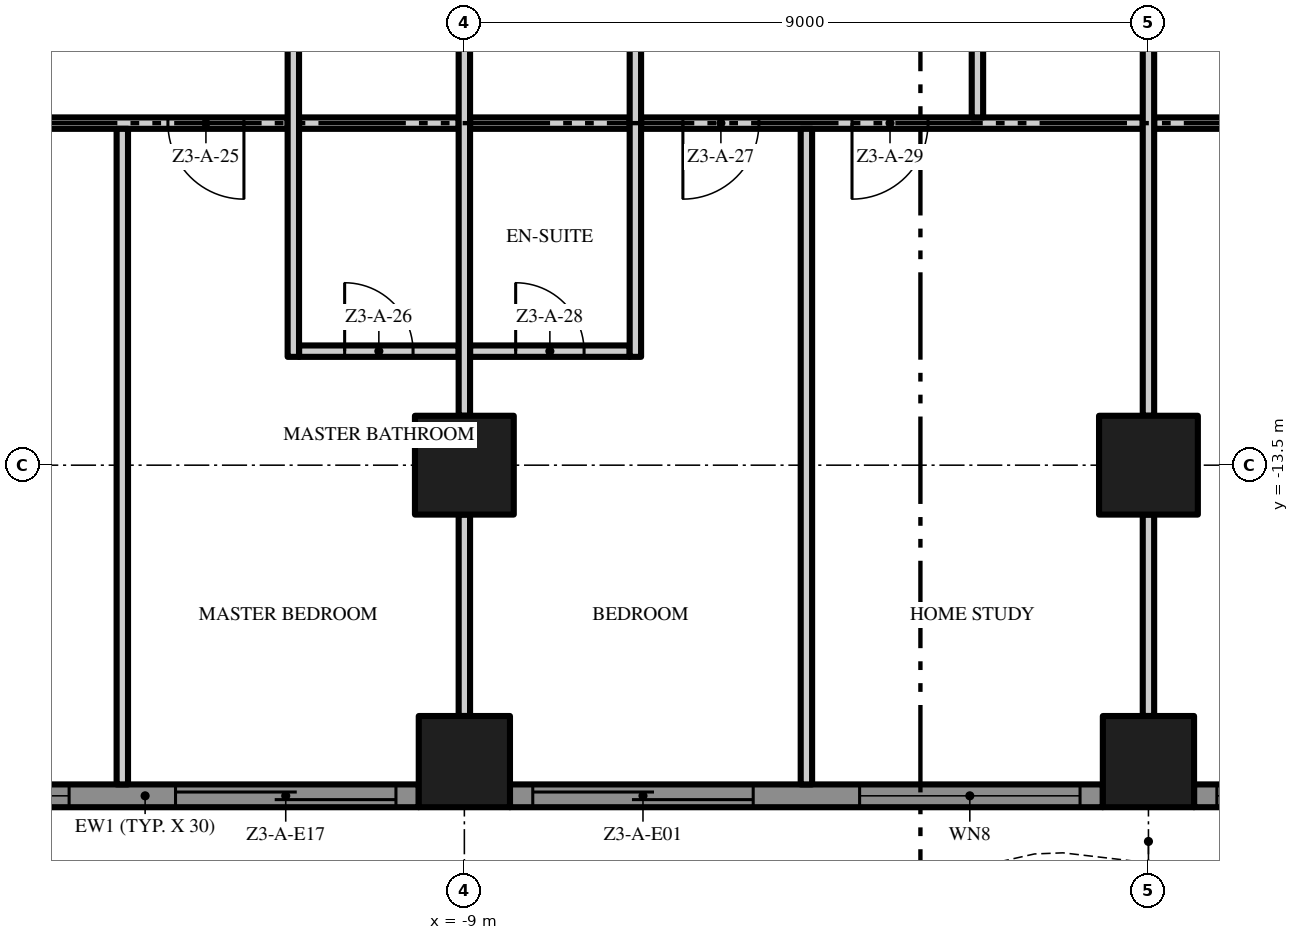
"""IFC4 building model, lengths in metres.
Left out: names, types, materials, properties, quantities, classifications, styles, units other than length and angle.
Written with IfcOpenShell. Run it as: python <this file> out.ifc"""

import sys

from ifc_helpers import new_model, si_unit, direction, frame, frame_2d, origin, origin_2d, place, context, subcontext, project, spatial, polyline, rectangle, outline, extrude, element, fill, save


model = new_model("IFC4")
c1 = context("Model", 3, precision=1e-05, world=origin(), true_north=direction((0.0, 1.0)))
c2 = subcontext(c1, "Body", "Model", "MODEL_VIEW")
j1 = project(units=[si_unit("LENGTHUNIT", "METRE"), si_unit("PLANEANGLEUNIT", "RADIAN")], contexts=[c1])
p1 = place(None, origin())
s1 = spatial("IfcSite", under=j1, at=p1, CompositionType="ELEMENT")
p2 = place(p1, origin())
s2 = spatial("IfcBuilding", under=s1, at=p2, CompositionType="ELEMENT")
p3 = place(p2, frame((0.0, 0.0, 132.6)))
s3 = spatial("IfcBuildingStorey", under=s2, at=p3, CompositionType="ELEMENT", Elevation=132.6)
p4 = place(p3, frame((-9.0, -13.5, 0.0), z_axis=(0.0, 0.0, 1.0), x_axis=(1.0, 0.0, 0.0)))
e1 = element("IfcColumn", 1, at=p4, inside=s3, PredefinedType="COLUMN", context=c2, shape_type="SweptSolid", body=[
    extrude(rectangle(XDim=1.3, YDim=1.3, at=origin_2d()), origin(), (0.0, 0.0, 1.0), 3.5),
])
p5 = place(p3, frame((-9.0, -17.4, 0.0), z_axis=(0.0, 0.0, 1.0), x_axis=(1.0, 0.0, 0.0)))
e2 = element("IfcColumn", 2, at=p5, inside=s3, PredefinedType="COLUMN", context=c2, shape_type="SweptSolid", body=[
    extrude(rectangle(XDim=1.2, YDim=1.2, at=origin_2d()), origin(), (0.0, 0.0, 1.0), 3.5),
])
p6 = place(p3, frame((0.0, -13.5, 0.0), z_axis=(0.0, 0.0, 1.0), x_axis=(1.0, 0.0, 0.0)))
e3 = element("IfcColumn", 3, at=p6, inside=s3, PredefinedType="COLUMN", context=c2, shape_type="SweptSolid", body=[
    extrude(rectangle(XDim=1.3, YDim=1.3, at=origin_2d()), origin(), (0.0, 0.0, 1.0), 3.5),
])
p7 = place(p3, frame((0.0, -17.4, 0.0), z_axis=(0.0, 0.0, 1.0), x_axis=(1.0, 0.0, 0.0)))
e4 = element("IfcColumn", 4, at=p7, inside=s3, PredefinedType="COLUMN", context=c2, shape_type="SweptSolid", body=[
    extrude(rectangle(XDim=1.2, YDim=1.2, at=origin_2d()), origin(), (0.0, 0.0, 1.0), 3.5),
])
p8 = place(p3, frame((-9.6, -17.85, 0.0), z_axis=(0.0, 0.0, 1.0), x_axis=(-1.0, 0.0, 0.0)))
e5 = element("IfcWall", 5, at=p8, inside=s3, PredefinedType="SOLIDWALL", context=c2, shape_type="SweptSolid", body=[
    extrude(rectangle(XDim=7.2, YDim=0.3, at=frame_2d((3.6, 0.0))), origin(), (0.0, 0.0, 1.0), 3.5),
])
p9 = place(p8, frame((4.6, 0.0, 0.45)))
e6 = element("IfcOpeningElement", 6, at=p9, cuts=e5, PredefinedType="OPENING", context=c2, shape_type="SweptSolid", body=[
    extrude(rectangle(XDim=2.3, YDim=2.65, at=frame_2d((1.15, 1.325))), frame((0.0, 0.16, 0.0), z_axis=(0.0, -1.0, 0.0), x_axis=(1.0, 0.0, 0.0)), (0.0, 0.0, 1.0), 0.32),
])
p10 = place(p8, frame((0.3, 0.0, 0.0)))
e7 = element("IfcOpeningElement", 7, at=p10, cuts=e5, PredefinedType="OPENING", context=c2, shape_type="SweptSolid", body=[
    extrude(rectangle(XDim=2.9, YDim=2.4, at=frame_2d((1.45, 1.2))), frame((0.0, 0.16, 0.0), z_axis=(0.0, -1.0, 0.0), x_axis=(1.0, 0.0, 0.0)), (0.0, 0.0, 1.0), 0.32),
])
p11 = place(p3, frame((-0.6, -17.85, 0.0), z_axis=(0.0, 0.0, 1.0), x_axis=(-1.0, 0.0, 0.0)))
e8 = element("IfcWall", 8, at=p11, inside=s3, PredefinedType="SOLIDWALL", context=c2, shape_type="SweptSolid", body=[
    extrude(rectangle(XDim=7.8, YDim=0.3, at=frame_2d((3.9, 0.0))), origin(), (0.0, 0.0, 1.0), 3.5),
])
p12 = place(p11, frame((4.6, 0.0, 0.0)))
e9 = element("IfcOpeningElement", 9, at=p12, cuts=e8, PredefinedType="OPENING", context=c2, shape_type="SweptSolid", body=[
    extrude(rectangle(XDim=2.9, YDim=2.4, at=frame_2d((1.45, 1.2))), frame((0.0, 0.16, 0.0), z_axis=(0.0, -1.0, 0.0), x_axis=(1.0, 0.0, 0.0)), (0.0, 0.0, 1.0), 0.32),
])
p13 = place(p11, frame((0.3, 0.0, 0.45)))
e10 = element("IfcOpeningElement", 10, at=p13, cuts=e8, PredefinedType="OPENING", context=c2, shape_type="SweptSolid", body=[
    extrude(rectangle(XDim=2.9, YDim=2.65, at=frame_2d((1.45, 1.325))), frame((0.0, 0.16, 0.0), z_axis=(0.0, -1.0, 0.0), x_axis=(1.0, 0.0, 0.0)), (0.0, 0.0, 1.0), 0.32),
])
p14 = place(p3, frame((8.4, -17.85, 0.0), z_axis=(0.0, 0.0, 1.0), x_axis=(-1.0, 0.0, 0.0)))
e11 = element("IfcWall", 11, at=p14, inside=s3, PredefinedType="SOLIDWALL", context=c2, shape_type="SweptSolid", body=[
    extrude(rectangle(XDim=7.8, YDim=0.3, at=frame_2d((3.9, 0.0))), origin(), (0.0, 0.0, 1.0), 3.5),
])
p15 = place(p14, frame((4.6, 0.0, 0.45)))
e12 = element("IfcOpeningElement", 12, at=p15, cuts=e11, PredefinedType="OPENING", context=c2, shape_type="SweptSolid", body=[
    extrude(rectangle(XDim=2.9, YDim=2.65, at=frame_2d((1.45, 1.325))), frame((0.0, 0.16, 0.0), z_axis=(0.0, -1.0, 0.0), x_axis=(1.0, 0.0, 0.0)), (0.0, 0.0, 1.0), 0.32),
])
p16 = place(p14, frame((0.3, 0.0, 0.0)))
e13 = element("IfcOpeningElement", 13, at=p16, cuts=e11, PredefinedType="OPENING", context=c2, shape_type="SweptSolid", body=[
    extrude(rectangle(XDim=2.9, YDim=2.4, at=frame_2d((1.45, 1.2))), frame((0.0, 0.16, 0.0), z_axis=(0.0, -1.0, 0.0), x_axis=(1.0, 0.0, 0.0)), (0.0, 0.0, 1.0), 0.32),
])
p17 = place(p3, origin())
e14 = element("IfcWall", 14, at=p17, inside=s3, PredefinedType="USERDEFINED", context=c2, shape_type="SweptSolid", body=[
    extrude(outline(polyline([(-18.0, -18.951), (-16.5, -18.615), (-16.125, -18.6), (-15.0, -18.731), (-13.5, -19.255), (-12.0, -19.988), (-10.5, -20.649), (-9.0, -20.985), (-8.625, -21.0), (-7.5, -20.869), (-6.0, -20.345), (-4.5, -19.612), (-3.0, -18.951), (-1.5, -18.615), (-1.125, -18.6), (0.0, -18.731), (1.5, -19.255), (3.0, -19.988), (4.5, -20.649), (6.0, -20.985), (6.375, -21.0), (7.5, -20.869), (9.0, -20.345), (10.5, -19.612), (12.0, -18.951), (13.5, -18.615), (13.875, -18.6), (15.0, -18.731), (16.5, -19.255), (18.0, -19.988), (18.11, -19.763), (16.596, -19.024), (15.056, -18.486), (13.885, -18.349), (13.467, -18.366), (11.921, -18.713), (10.395, -19.385), (8.904, -20.114), (7.444, -20.624), (6.365, -20.749), (6.033, -20.736), (4.579, -20.41), (3.105, -19.761), (1.596, -19.024), (0.056, -18.486), (-1.115, -18.349), (-1.533, -18.366), (-3.079, -18.713), (-4.605, -19.385), (-6.096, -20.114), (-7.556, -20.624), (-8.635, -20.749), (-8.967, -20.736), (-10.421, -20.41), (-11.895, -19.761), (-13.404, -19.024), (-14.944, -18.486), (-16.115, -18.349), (-16.533, -18.366), (-18.055, -18.708), (-18.0, -18.951)])), origin(), (0.0, 0.0, 1.0), 0.9),
])
p18 = place(p3, frame((-11.175, -12.0, 0.0), z_axis=(0.0, 0.0, 1.0), x_axis=(1.0, 0.0, 0.0)))
e15 = element("IfcWall", 15, at=p18, inside=s3, PredefinedType="PARTITIONING", context=c2, shape_type="SweptSolid", body=[
    extrude(rectangle(XDim=2.1, YDim=0.15, at=frame_2d((1.05, 0.0))), origin(), (0.0, 0.0, 1.0), 3.5),
])
p19 = place(p18, frame((0.6, 0.0, 0.0)))
e16 = element("IfcOpeningElement", 16, at=p19, cuts=e15, PredefinedType="OPENING", context=c2, shape_type="SweptSolid", body=[
    extrude(rectangle(XDim=0.9, YDim=2.1, at=frame_2d((0.45, 1.05))), frame((0.0, 0.085, 0.0), z_axis=(0.0, -1.0, 0.0), x_axis=(1.0, 0.0, 0.0)), (0.0, 0.0, 1.0), 0.17),
])
p20 = place(p3, frame((-8.925, -12.0, 0.0), z_axis=(0.0, 0.0, 1.0), x_axis=(1.0, 0.0, 0.0)))
e17 = element("IfcWall", 17, at=p20, inside=s3, PredefinedType="PARTITIONING", context=c2, shape_type="SweptSolid", body=[
    extrude(rectangle(XDim=2.1, YDim=0.15, at=frame_2d((1.05, 0.0))), origin(), (0.0, 0.0, 1.0), 3.5),
])
p21 = place(p20, frame((0.6, 0.0, 0.0)))
e18 = element("IfcOpeningElement", 18, at=p21, cuts=e17, PredefinedType="OPENING", context=c2, shape_type="SweptSolid", body=[
    extrude(rectangle(XDim=0.9, YDim=2.1, at=frame_2d((0.45, 1.05))), frame((0.0, 0.085, 0.0), z_axis=(0.0, -1.0, 0.0), x_axis=(1.0, 0.0, 0.0)), (0.0, 0.0, 1.0), 0.17),
])
p22 = place(p3, frame((-11.325, -9.0, 0.0), z_axis=(0.0, 0.0, 1.0), x_axis=(-1.0, 0.0, 0.0)))
e19 = element("IfcWall", 19, at=p22, inside=s3, PredefinedType="PARTITIONING", context=c2, shape_type="SweptSolid", body=[
    extrude(rectangle(XDim=10.875, YDim=0.15, at=frame_2d((5.438, 0.0))), origin(), (0.0, 0.0, 1.0), 3.5),
])
p23 = place(p22, frame((3.175, 0.0, 0.0)))
e20 = element("IfcOpeningElement", 20, at=p23, cuts=e19, PredefinedType="OPENING", context=c2, shape_type="SweptSolid", body=[
    extrude(rectangle(XDim=1.8, YDim=2.4, at=frame_2d((0.9, 1.2))), frame((0.0, 0.085, 0.0), z_axis=(0.0, -1.0, 0.0), x_axis=(1.0, 0.0, 0.0)), (0.0, 0.0, 1.0), 0.17),
])
p24 = place(p22, frame((0.575, 0.0, 0.0)))
e21 = element("IfcOpeningElement", 21, at=p24, cuts=e19, PredefinedType="OPENING", context=c2, shape_type="SweptSolid", body=[
    extrude(rectangle(XDim=1.0, YDim=2.4, at=frame_2d((0.5, 1.2))), frame((0.0, 0.085, 0.0), z_axis=(0.0, -1.0, 0.0), x_axis=(1.0, 0.0, 0.0)), (0.0, 0.0, 1.0), 0.17),
])
for number, where, z_axis, x_axis in (
    (22, (-11.175, -9.0, 0.0), (0.0, 0.0, 1.0), (1.0, 0.0, 0.0)),
    (23, (-8.925, -9.0, 0.0), (0.0, 0.0, 1.0), (1.0, 0.0, 0.0)),
):
    element("IfcWall", number, at=place(p3, frame(where, z_axis=z_axis, x_axis=x_axis)), inside=s3, PredefinedType="PARTITIONING", context=c2, shape_type="SweptSolid", body=[
        extrude(rectangle(XDim=2.1, YDim=0.15, at=frame_2d((1.05, 0.0))), origin(), (0.0, 0.0, 1.0), 3.5),
    ])
p25 = place(p3, frame((-0.075, -9.0, 0.0), z_axis=(0.0, 0.0, 1.0), x_axis=(-1.0, 0.0, 0.0)))
e24 = element("IfcWall", 24, at=p25, inside=s3, PredefinedType="PARTITIONING", context=c2, shape_type="SweptSolid", body=[
    extrude(rectangle(XDim=6.6, YDim=0.15, at=frame_2d((3.3, 0.0))), origin(), (0.0, 0.0, 1.0), 3.5),
])
p26 = place(p25, frame((5.05, 0.0, 0.0)))
e25 = element("IfcOpeningElement", 25, at=p26, cuts=e24, PredefinedType="OPENING", context=c2, shape_type="SweptSolid", body=[
    extrude(rectangle(XDim=1.0, YDim=2.4, at=frame_2d((0.5, 1.2))), frame((0.0, 0.085, 0.0), z_axis=(0.0, -1.0, 0.0), x_axis=(1.0, 0.0, 0.0)), (0.0, 0.0, 1.0), 0.17),
])
p27 = place(p25, frame((2.825, 0.0, 0.0)))
e26 = element("IfcOpeningElement", 26, at=p27, cuts=e24, PredefinedType="OPENING", context=c2, shape_type="SweptSolid", body=[
    extrude(rectangle(XDim=1.0, YDim=2.4, at=frame_2d((0.5, 1.2))), frame((0.0, 0.085, 0.0), z_axis=(0.0, -1.0, 0.0), x_axis=(1.0, 0.0, 0.0)), (0.0, 0.0, 1.0), 0.17),
])
p28 = place(p3, frame((8.925, -9.0, 0.0), z_axis=(0.0, 0.0, 1.0), x_axis=(-1.0, 0.0, 0.0)))
e27 = element("IfcWall", 27, at=p28, inside=s3, PredefinedType="PARTITIONING", context=c2, shape_type="SweptSolid", body=[
    extrude(rectangle(XDim=8.85, YDim=0.15, at=frame_2d((4.425, 0.0))), origin(), (0.0, 0.0, 1.0), 3.5),
])
p29 = place(p28, frame((6.3, 0.0, 0.0)))
e28 = element("IfcOpeningElement", 28, at=p29, cuts=e27, PredefinedType="OPENING", context=c2, shape_type="SweptSolid", body=[
    extrude(rectangle(XDim=1.5, YDim=2.4, at=frame_2d((0.75, 1.2))), frame((0.0, 0.085, 0.0), z_axis=(0.0, -1.0, 0.0), x_axis=(1.0, 0.0, 0.0)), (0.0, 0.0, 1.0), 0.17),
])
p30 = place(p3, frame((-13.5, -17.7, 0.0), z_axis=(0.0, 0.0, 1.0), x_axis=(0.0, 1.0, 0.0)))
e29 = element("IfcWall", 29, at=p30, inside=s3, PredefinedType="PARTITIONING", context=c2, shape_type="SweptSolid", body=[
    extrude(rectangle(XDim=8.625, YDim=0.15, at=frame_2d((4.312, 0.0))), origin(), (0.0, 0.0, 1.0), 3.5),
])
p31 = place(p3, frame((-11.25, -4.575, 0.0), z_axis=(0.0, 0.0, 1.0), x_axis=(0.0, -1.0, 0.0)))
e30 = element("IfcWall", 30, at=p31, inside=s3, PredefinedType="PARTITIONING", context=c2, shape_type="SweptSolid", body=[
    extrude(rectangle(XDim=7.5, YDim=0.15, at=frame_2d((3.75, 0.0))), origin(), (0.0, 0.0, 1.0), 3.5),
])
p32 = place(p31, frame((1.725, 0.0, 0.0)))
e31 = element("IfcOpeningElement", 31, at=p32, cuts=e30, PredefinedType="OPENING", context=c2, shape_type="SweptSolid", body=[
    extrude(rectangle(XDim=0.9, YDim=2.1, at=frame_2d((0.45, 1.05))), frame((0.0, 0.085, 0.0), z_axis=(0.0, -1.0, 0.0), x_axis=(1.0, 0.0, 0.0)), (0.0, 0.0, 1.0), 0.17),
])
p33 = place(p3, frame((-9.0, -16.8, 0.0), z_axis=(0.0, 0.0, 1.0), x_axis=(0.0, 1.0, 0.0)))
e32 = element("IfcWall", 32, at=p33, inside=s3, PredefinedType="PARTITIONING", context=c2, shape_type="SweptSolid", body=[
    extrude(rectangle(XDim=2.65, YDim=0.15, at=frame_2d((1.325, 0.0))), origin(), (0.0, 0.0, 1.0), 3.5),
])
p34 = place(p3, frame((-9.0, -12.85, 0.0), z_axis=(0.0, 0.0, 1.0), x_axis=(0.0, 1.0, 0.0)))
e33 = element("IfcWall", 33, at=p34, inside=s3, PredefinedType="PARTITIONING", context=c2, shape_type="SweptSolid", body=[
    extrude(rectangle(XDim=7.7, YDim=0.15, at=frame_2d((3.85, 0.0))), origin(), (0.0, 0.0, 1.0), 3.5),
])
p35 = place(p3, frame((-6.75, -12.075, 0.0), z_axis=(0.0, 0.0, 1.0), x_axis=(0.0, 1.0, 0.0)))
e34 = element("IfcWall", 34, at=p35, inside=s3, PredefinedType="PARTITIONING", context=c2, shape_type="SweptSolid", body=[
    extrude(rectangle(XDim=7.65, YDim=0.15, at=frame_2d((3.825, 0.0))), origin(), (0.0, 0.0, 1.0), 3.5),
])
p36 = place(p3, frame((-4.5, -17.7, 0.0), z_axis=(0.0, 0.0, 1.0), x_axis=(0.0, 1.0, 0.0)))
e35 = element("IfcWall", 35, at=p36, inside=s3, PredefinedType="PARTITIONING", context=c2, shape_type="SweptSolid", body=[
    extrude(rectangle(XDim=8.625, YDim=0.15, at=frame_2d((4.312, 0.0))), origin(), (0.0, 0.0, 1.0), 3.5),
])
p37 = place(p3, frame((-2.25, -8.925, 0.0), z_axis=(0.0, 0.0, 1.0), x_axis=(0.0, 1.0, 0.0)))
e36 = element("IfcWall", 36, at=p37, inside=s3, PredefinedType="PARTITIONING", context=c2, shape_type="SweptSolid", body=[
    extrude(rectangle(XDim=4.5, YDim=0.15, at=frame_2d((2.25, 0.0))), origin(), (0.0, 0.0, 1.0), 3.5),
])
p38 = place(p3, frame((0.0, -16.8, 0.0), z_axis=(0.0, 0.0, 1.0), x_axis=(0.0, 1.0, 0.0)))
e37 = element("IfcWall", 37, at=p38, inside=s3, PredefinedType="PARTITIONING", context=c2, shape_type="SweptSolid", body=[
    extrude(rectangle(XDim=2.65, YDim=0.15, at=frame_2d((1.325, 0.0))), origin(), (0.0, 0.0, 1.0), 3.5),
])
p39 = place(p3, frame((0.0, -12.85, 0.0), z_axis=(0.0, 0.0, 1.0), x_axis=(0.0, 1.0, 0.0)))
e38 = element("IfcWall", 38, at=p39, inside=s3, PredefinedType="PARTITIONING", context=c2, shape_type="SweptSolid", body=[
    extrude(rectangle(XDim=7.7, YDim=0.15, at=frame_2d((3.85, 0.0))), origin(), (0.0, 0.0, 1.0), 3.5),
])
p40 = place(p9, origin())
e39 = element("IfcWindow", 39, at=p40, inside=s3, PartitioningType="SINGLE_PANEL", PredefinedType="WINDOW", context=c2, shape_type="SweptSolid", body=[
    extrude(rectangle(XDim=2.3, YDim=2.65, at=frame_2d((1.15, 1.325))), frame((0.0, 0.03, 0.0), z_axis=(0.0, -1.0, 0.0), x_axis=(1.0, 0.0, 0.0)), (0.0, 0.0, 1.0), 0.06),
])
fill(e6, e39)
p41 = place(p10, origin())
e40 = element("IfcDoor", 40, at=p41, inside=s3, OperationType="SINGLE_SWING_LEFT", PredefinedType="DOOR", context=c2, shape_type="SweptSolid", body=[
    extrude(rectangle(XDim=2.9, YDim=2.4, at=frame_2d((1.45, 1.2))), frame((0.0, 0.025, 0.0), z_axis=(0.0, -1.0, 0.0), x_axis=(1.0, 0.0, 0.0)), (0.0, 0.0, 1.0), 0.05),
])
fill(e7, e40)
p42 = place(p12, origin())
e41 = element("IfcDoor", 41, at=p42, inside=s3, OperationType="SINGLE_SWING_LEFT", PredefinedType="DOOR", context=c2, shape_type="SweptSolid", body=[
    extrude(rectangle(XDim=2.9, YDim=2.4, at=frame_2d((1.45, 1.2))), frame((0.0, 0.025, 0.0), z_axis=(0.0, -1.0, 0.0), x_axis=(1.0, 0.0, 0.0)), (0.0, 0.0, 1.0), 0.05),
])
fill(e9, e41)
p43 = place(p13, origin())
e42 = element("IfcWindow", 42, at=p43, inside=s3, PartitioningType="SINGLE_PANEL", PredefinedType="WINDOW", context=c2, shape_type="SweptSolid", body=[
    extrude(rectangle(XDim=2.9, YDim=2.65, at=frame_2d((1.45, 1.325))), frame((0.0, 0.03, 0.0), z_axis=(0.0, -1.0, 0.0), x_axis=(1.0, 0.0, 0.0)), (0.0, 0.0, 1.0), 0.06),
])
fill(e10, e42)
p44 = place(p15, origin())
e43 = element("IfcWindow", 43, at=p44, inside=s3, PartitioningType="SINGLE_PANEL", PredefinedType="WINDOW", context=c2, shape_type="SweptSolid", body=[
    extrude(rectangle(XDim=2.9, YDim=2.65, at=frame_2d((1.45, 1.325))), frame((0.0, 0.03, 0.0), z_axis=(0.0, -1.0, 0.0), x_axis=(1.0, 0.0, 0.0)), (0.0, 0.0, 1.0), 0.06),
])
fill(e12, e43)
p45 = place(p24, origin())
e44 = element("IfcDoor", 44, at=p45, inside=s3, OperationType="SINGLE_SWING_LEFT", PredefinedType="DOOR", context=c2, shape_type="SweptSolid", body=[
    extrude(rectangle(XDim=1.0, YDim=2.4, at=frame_2d((0.5, 1.2))), frame((0.0, 0.025, 0.0), z_axis=(0.0, -1.0, 0.0), x_axis=(1.0, 0.0, 0.0)), (0.0, 0.0, 1.0), 0.05),
])
fill(e21, e44)
p46 = place(p19, origin())
e45 = element("IfcDoor", 45, at=p46, inside=s3, OperationType="SINGLE_SWING_LEFT", PredefinedType="DOOR", context=c2, shape_type="SweptSolid", body=[
    extrude(rectangle(XDim=0.9, YDim=2.1, at=frame_2d((0.45, 1.05))), frame((0.0, 0.025, 0.0), z_axis=(0.0, -1.0, 0.0), x_axis=(1.0, 0.0, 0.0)), (0.0, 0.0, 1.0), 0.05),
])
fill(e16, e45)
p47 = place(p26, origin())
e46 = element("IfcDoor", 46, at=p47, inside=s3, OperationType="SINGLE_SWING_RIGHT", PredefinedType="DOOR", context=c2, shape_type="SweptSolid", body=[
    extrude(rectangle(XDim=1.0, YDim=2.4, at=frame_2d((0.5, 1.2))), frame((0.0, 0.025, 0.0), z_axis=(0.0, -1.0, 0.0), x_axis=(1.0, 0.0, 0.0)), (0.0, 0.0, 1.0), 0.05),
])
fill(e25, e46)
p48 = place(p21, origin())
e47 = element("IfcDoor", 47, at=p48, inside=s3, OperationType="SINGLE_SWING_LEFT", PredefinedType="DOOR", context=c2, shape_type="SweptSolid", body=[
    extrude(rectangle(XDim=0.9, YDim=2.1, at=frame_2d((0.45, 1.05))), frame((0.0, 0.025, 0.0), z_axis=(0.0, -1.0, 0.0), x_axis=(1.0, 0.0, 0.0)), (0.0, 0.0, 1.0), 0.05),
])
fill(e18, e47)
p49 = place(p27, origin())
e48 = element("IfcDoor", 48, at=p49, inside=s3, OperationType="SINGLE_SWING_RIGHT", PredefinedType="DOOR", context=c2, shape_type="SweptSolid", body=[
    extrude(rectangle(XDim=1.0, YDim=2.4, at=frame_2d((0.5, 1.2))), frame((0.0, 0.025, 0.0), z_axis=(0.0, -1.0, 0.0), x_axis=(1.0, 0.0, 0.0)), (0.0, 0.0, 1.0), 0.05),
])
fill(e26, e48)
save(model, sys.argv[1])
